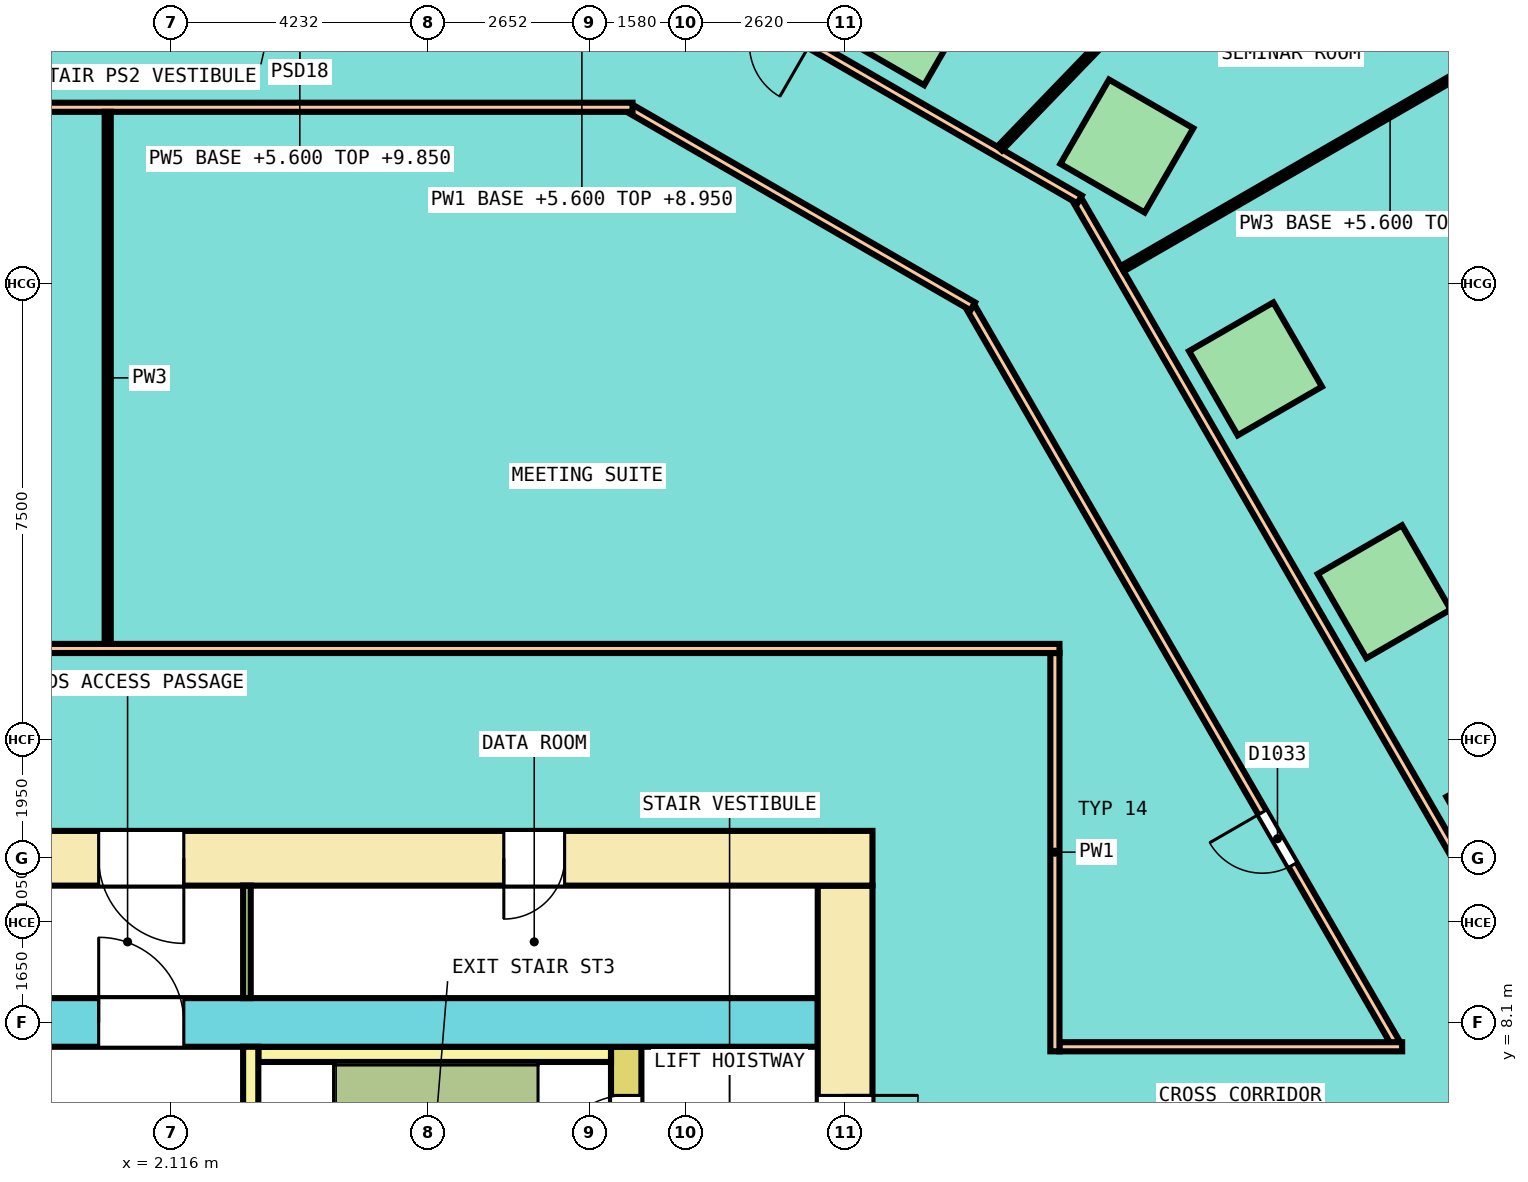
"""IFC4 building model, lengths in metres.
Left out: names, types, materials, properties, quantities, classifications, styles, units other than length and angle.
Written with IfcOpenShell. Run it as: python <this file> out.ifc"""

import sys

from ifc_helpers import new_model, si_unit, direction, frame, frame_2d, origin, origin_2d, place, context, subcontext, project, spatial, rectangle, extrude, element, fill, save


model = new_model("IFC4")
c1 = context("Model", 3, precision=1e-05, world=origin(), true_north=direction((0.0, 1.0)))
c2 = subcontext(c1, "Body", "Model", "MODEL_VIEW")
j1 = project(units=[si_unit("LENGTHUNIT", "METRE"), si_unit("PLANEANGLEUNIT", "RADIAN")], contexts=[c1])
p1 = place(None, origin())
s1 = spatial("IfcSite", under=j1, at=p1, CompositionType="ELEMENT")
p2 = place(p1, origin())
s2 = spatial("IfcBuilding", under=s1, at=p2, CompositionType="ELEMENT")
p3 = place(p2, frame((0.0, 0.0, 5.6)))
s3 = spatial("IfcBuildingStorey", under=s2, at=p3, CompositionType="ELEMENT", Elevation=5.6)
for number, where, z_axis, x_axis in (
    (1, (24.181, 11.518, 0.0), (0.0, 0.0, 1.0), (-0.5, 0.866, 0.0)),
    (2, (22.065, 15.183, 0.0), (0.0, 0.0, 1.0), (-0.5, 0.866, 0.0)),
    (3, (19.949, 18.847, 0.0), (0.0, 0.0, 1.0), (-0.5, 0.866, 0.0)),
    (4, (17.833, 22.512, 0.0), (0.0, 0.0, 1.0), (-0.866, 0.5, 0.0)),
    (5, (14.206, 24.606, 0.0), (0.0, 0.0, 1.0), (-0.866, 0.5, 0.0)),
):
    element("IfcColumn", number, at=place(p3, frame(where, z_axis=z_axis, x_axis=x_axis)), inside=s3, PredefinedType="COLUMN", context=c2, shape_type="SweptSolid", body=[
        extrude(rectangle(XDim=1.6, YDim=1.6, at=origin_2d()), origin(), (0.0, 0.0, 1.0), 4.25),
    ])
p4 = place(p3, frame((-13.65, 10.8, 0.0), z_axis=(0.0, 0.0, 1.0), x_axis=(1.0, 0.0, 0.0)))
e6 = element("IfcWall", 6, at=p4, inside=s3, PredefinedType="SHEAR", context=c2, shape_type="SweptSolid", body=[
    extrude(rectangle(XDim=27.3, YDim=0.9, at=frame_2d((13.65, 0.0))), origin(), (0.0, 0.0, 1.0), 4.3),
])
p5 = place(p4, frame((1.892, 0.0, 0.0)))
e7 = element("IfcOpeningElement", 7, at=p5, cuts=e6, PredefinedType="OPENING", context=c2, shape_type="SweptSolid", body=[
    extrude(rectangle(XDim=1.0, YDim=2.1, at=frame_2d((0.5, 1.05))), frame((0.0, 0.46, 0.0), z_axis=(0.0, -1.0, 0.0), x_axis=(1.0, 0.0, 0.0)), (0.0, 0.0, 1.0), 0.92),
])
p6 = place(p4, frame((4.97, 0.0, 0.0)))
e8 = element("IfcOpeningElement", 8, at=p6, cuts=e6, PredefinedType="OPENING", context=c2, shape_type="SweptSolid", body=[
    extrude(rectangle(XDim=1.0, YDim=2.1, at=frame_2d((0.5, 1.05))), frame((0.0, 0.46, 0.0), z_axis=(0.0, -1.0, 0.0), x_axis=(1.0, 0.0, 0.0)), (0.0, 0.0, 1.0), 0.92),
])
p7 = place(p4, frame((8.017, 0.0, 0.0)))
e9 = element("IfcOpeningElement", 9, at=p7, cuts=e6, PredefinedType="OPENING", context=c2, shape_type="SweptSolid", body=[
    extrude(rectangle(XDim=1.0, YDim=2.1, at=frame_2d((0.5, 1.05))), frame((0.0, 0.46, 0.0), z_axis=(0.0, -1.0, 0.0), x_axis=(1.0, 0.0, 0.0)), (0.0, 0.0, 1.0), 0.92),
])
p8 = place(p4, frame((11.064, 0.0, 0.0)))
e10 = element("IfcOpeningElement", 10, at=p8, cuts=e6, PredefinedType="OPENING", context=c2, shape_type="SweptSolid", body=[
    extrude(rectangle(XDim=1.0, YDim=2.1, at=frame_2d((0.5, 1.05))), frame((0.0, 0.46, 0.0), z_axis=(0.0, -1.0, 0.0), x_axis=(1.0, 0.0, 0.0)), (0.0, 0.0, 1.0), 0.92),
])
p9 = place(p4, frame((21.238, 0.0, 0.0)))
e11 = element("IfcOpeningElement", 11, at=p9, cuts=e6, PredefinedType="OPENING", context=c2, shape_type="SweptSolid", body=[
    extrude(rectangle(XDim=1.0, YDim=2.1, at=frame_2d((0.5, 1.05))), frame((0.0, 0.46, 0.0), z_axis=(0.0, -1.0, 0.0), x_axis=(1.0, 0.0, 0.0)), (0.0, 0.0, 1.0), 0.92),
])
p10 = place(p4, frame((14.575, 0.0, 0.0)))
e12 = element("IfcOpeningElement", 12, at=p10, cuts=e6, PredefinedType="OPENING", context=c2, shape_type="SweptSolid", body=[
    extrude(rectangle(XDim=1.4, YDim=2.1, at=frame_2d((0.7, 1.05))), frame((0.0, 0.46, 0.0), z_axis=(0.0, -1.0, 0.0), x_axis=(1.0, 0.0, 0.0)), (0.0, 0.0, 1.0), 0.92),
])
p11 = place(p3, frame((13.2, -10.35, 0.0), z_axis=(0.0, 0.0, 1.0), x_axis=(0.0, 1.0, 0.0)))
e13 = element("IfcWall", 13, at=p11, inside=s3, PredefinedType="SHEAR", context=c2, shape_type="SweptSolid", body=[
    extrude(rectangle(XDim=20.7, YDim=0.9, at=frame_2d((10.35, 0.0))), origin(), (0.0, 0.0, 1.0), 4.3),
])
p12 = place(p11, frame((9.15, 0.0, 0.0)))
e14 = element("IfcOpeningElement", 14, at=p12, cuts=e13, PredefinedType="OPENING", context=c2, shape_type="SweptSolid", body=[
    extrude(rectangle(XDim=2.4, YDim=2.1, at=frame_2d((1.2, 1.05))), frame((0.0, 0.46, 0.0), z_axis=(0.0, -1.0, 0.0), x_axis=(1.0, 0.0, 0.0)), (0.0, 0.0, 1.0), 0.92),
])
p13 = place(p11, frame((16.05, 0.0, 0.0)))
e15 = element("IfcOpeningElement", 15, at=p13, cuts=e13, PredefinedType="OPENING", context=c2, shape_type="SweptSolid", body=[
    extrude(rectangle(XDim=1.2, YDim=2.1, at=frame_2d((0.6, 1.05))), frame((0.0, 0.46, 0.0), z_axis=(0.0, -1.0, 0.0), x_axis=(1.0, 0.0, 0.0)), (0.0, 0.0, 1.0), 0.92),
])
p14 = place(p11, frame((2.819, 0.0, 0.0)))
e16 = element("IfcOpeningElement", 16, at=p14, cuts=e13, PredefinedType="OPENING", context=c2, shape_type="SweptSolid", body=[
    extrude(rectangle(XDim=1.0, YDim=2.1, at=frame_2d((0.5, 1.05))), frame((0.0, 0.46, 0.0), z_axis=(0.0, -1.0, 0.0), x_axis=(1.0, 0.0, 0.0)), (0.0, 0.0, 1.0), 0.92),
])
p15 = place(p11, frame((4.281, 0.0, 0.0)))
e17 = element("IfcOpeningElement", 17, at=p15, cuts=e13, PredefinedType="OPENING", context=c2, shape_type="SweptSolid", body=[
    extrude(rectangle(XDim=1.0, YDim=2.1, at=frame_2d((0.5, 1.05))), frame((0.0, 0.46, 0.0), z_axis=(0.0, -1.0, 0.0), x_axis=(1.0, 0.0, 0.0)), (0.0, 0.0, 1.0), 0.92),
])
p16 = place(p3, frame((-12.75, 8.1, 0.0), z_axis=(0.0, 0.0, 1.0), x_axis=(1.0, 0.0, 0.0)))
e18 = element("IfcWall", 18, at=p16, inside=s3, PredefinedType="SHEAR", context=c2, shape_type="SweptSolid", body=[
    extrude(rectangle(XDim=25.5, YDim=0.8, at=frame_2d((12.75, 0.0))), origin(), (0.0, 0.0, 1.0), 4.3),
])
p17 = place(p16, frame((13.675, 0.0, 0.0)))
e19 = element("IfcOpeningElement", 19, at=p17, cuts=e18, PredefinedType="OPENING", context=c2, shape_type="SweptSolid", body=[
    extrude(rectangle(XDim=1.4, YDim=2.1, at=frame_2d((0.7, 1.05))), frame((0.0, 0.41, 0.0), z_axis=(0.0, -1.0, 0.0), x_axis=(1.0, 0.0, 0.0)), (0.0, 0.0, 1.0), 0.82),
])
p18 = place(p3, frame((9.6, -7.7, 0.0), z_axis=(0.0, 0.0, 1.0), x_axis=(0.0, 1.0, 0.0)))
e20 = element("IfcWall", 20, at=p18, inside=s3, PredefinedType="SHEAR", context=c2, shape_type="SweptSolid", body=[
    extrude(rectangle(XDim=15.4, YDim=0.5, at=frame_2d((7.7, 0.0))), origin(), (0.0, 0.0, 1.0), 4.3),
])
p19 = place(p18, frame((6.5, 0.0, 0.0)))
e21 = element("IfcOpeningElement", 21, at=p19, cuts=e20, PredefinedType="OPENING", context=c2, shape_type="SweptSolid", body=[
    extrude(rectangle(XDim=2.4, YDim=2.1, at=frame_2d((1.2, 1.05))), frame((0.0, 0.26, 0.0), z_axis=(0.0, -1.0, 0.0), x_axis=(1.0, 0.0, 0.0)), (0.0, 0.0, 1.0), 0.52),
])
p20 = place(p18, frame((13.4, 0.0, 0.0)))
e22 = element("IfcOpeningElement", 22, at=p20, cuts=e20, PredefinedType="OPENING", context=c2, shape_type="SweptSolid", body=[
    extrude(rectangle(XDim=1.2, YDim=2.1, at=frame_2d((0.6, 1.05))), frame((0.0, 0.26, 0.0), z_axis=(0.0, -1.0, 0.0), x_axis=(1.0, 0.0, 0.0)), (0.0, 0.0, 1.0), 0.52),
])
p21 = place(p18, frame((0.9, 0.0, 0.0)))
e23 = element("IfcOpeningElement", 23, at=p21, cuts=e20, PredefinedType="OPENING", context=c2, shape_type="SweptSolid", body=[
    extrude(rectangle(XDim=1.0, YDim=2.1, at=frame_2d((0.5, 1.05))), frame((0.0, 0.26, 0.0), z_axis=(0.0, -1.0, 0.0), x_axis=(1.0, 0.0, 0.0)), (0.0, 0.0, 1.0), 0.52),
])
p22 = place(p3, frame((3.55, 7.575, 0.0), z_axis=(0.0, 0.0, 1.0), x_axis=(1.0, 0.0, 0.0)))
e24 = element("IfcWall", 24, at=p22, inside=s3, PredefinedType="SOLIDWALL", context=c2, shape_type="SweptSolid", body=[
    extrude(rectangle(XDim=5.8, YDim=0.25, at=frame_2d((2.9, 0.0))), origin(), (0.0, 0.0, 1.0), 4.3),
])
p23 = place(p3, frame((3.425, 4.9, 0.0), z_axis=(0.0, 0.0, 1.0), x_axis=(0.0, 1.0, 0.0)))
e25 = element("IfcWall", 25, at=p23, inside=s3, PredefinedType="SOLIDWALL", context=c2, shape_type="SweptSolid", body=[
    extrude(rectangle(XDim=2.8, YDim=0.25, at=frame_2d((1.4, 0.0))), origin(), (0.0, 0.0, 1.0), 4.3),
])
p24 = place(p3, frame((3.363, 8.5, 0.0), z_axis=(0.0, 0.0, 1.0), x_axis=(0.0, 1.0, 0.0)))
e26 = element("IfcWall", 26, at=p24, inside=s3, PredefinedType="PARTITIONING", context=c2, shape_type="SweptSolid", body=[
    extrude(rectangle(XDim=1.85, YDim=0.125, at=frame_2d((0.925, 0.0))), origin(), (0.0, 0.0, 1.0), 4.3),
])
p25 = place(p3, frame((15.272, 19.849, 0.0), z_axis=(0.0, 0.0, 1.0), x_axis=(0.500000635496, -0.86602503688, 0.0)))
e27 = element("IfcWall", 27, at=p25, inside=s3, PredefinedType="PARTITIONING", context=c2, shape_type="SweptSolid", body=[
    extrude(rectangle(XDim=13.953, YDim=0.15, at=frame_2d((6.977, 0.0))), origin(), (0.0, 0.0, 1.0), 3.2),
])
p26 = place(p25, frame((9.577, 0.0, 0.0)))
e28 = element("IfcOpeningElement", 28, at=p26, cuts=e27, PredefinedType="OPENING", context=c2, shape_type="SweptSolid", body=[
    extrude(rectangle(XDim=1.0, YDim=2.1, at=frame_2d((0.5, 1.05))), frame((0.0, 0.085, 0.0), z_axis=(0.0, -1.0, 0.0), x_axis=(1.0, 0.0, 0.0)), (0.0, 0.0, 1.0), 0.17),
])
p27 = place(p3, frame((16.725, 7.7, 0.0), z_axis=(0.0, 0.0, 1.0), x_axis=(1.0, 0.0, 0.0)))
e29 = element("IfcWall", 29, at=p27, inside=s3, PredefinedType="PARTITIONING", context=c2, shape_type="SweptSolid", body=[
    extrude(rectangle(XDim=5.635, YDim=0.15, at=frame_2d((2.818, 0.0))), origin(), (0.0, 0.0, 1.0), 3.2),
])
p28 = place(p3, frame((17.029, 21.606, 0.0), z_axis=(0.0, 0.0, 1.0), x_axis=(0.499999139641, -0.866025900512, 0.0)))
e30 = element("IfcWall", 30, at=p28, inside=s3, PredefinedType="PARTITIONING", context=c2, shape_type="SweptSolid", body=[
    extrude(rectangle(XDim=20.394, YDim=0.15, at=frame_2d((10.197, 0.0))), origin(), (0.0, 0.0, 1.0), 3.2),
])
p29 = place(p28, frame((13.746, 0.0, 0.0)))
e31 = element("IfcOpeningElement", 31, at=p29, cuts=e30, PredefinedType="OPENING", context=c2, shape_type="SweptSolid", body=[
    extrude(rectangle(XDim=1.2, YDim=2.1, at=frame_2d((0.6, 1.05))), frame((0.0, 0.085, 0.0), z_axis=(0.0, -1.0, 0.0), x_axis=(1.0, 0.0, 0.0)), (0.0, 0.0, 1.0), 0.17),
])
p30 = place(p3, frame((10.337, 25.512, 0.0), z_axis=(0.0, 0.0, 1.0), x_axis=(0.866023143435, -0.50000391502, 0.0)))
e32 = element("IfcWall", 32, at=p30, inside=s3, PredefinedType="PARTITIONING", context=c2, shape_type="SweptSolid", body=[
    extrude(rectangle(XDim=7.759, YDim=0.15, at=frame_2d((3.879, 0.0))), origin(), (0.0, 0.0, 1.0), 3.2),
])
p31 = place(p30, frame((1.643, 0.0, 0.0)))
e33 = element("IfcOpeningElement", 33, at=p31, cuts=e32, PredefinedType="OPENING", context=c2, shape_type="SweptSolid", body=[
    extrude(rectangle(XDim=1.0, YDim=2.1, at=frame_2d((0.5, 1.05))), frame((0.0, 0.085, 0.0), z_axis=(0.0, -1.0, 0.0), x_axis=(1.0, 0.0, 0.0)), (0.0, 0.0, 1.0), 0.17),
])
p32 = place(p3, frame((9.694, 23.113, 0.0), z_axis=(0.0, 0.0, 1.0), x_axis=(0.866024786089, -0.500001069878, 0.0)))
e34 = element("IfcWall", 34, at=p32, inside=s3, PredefinedType="PARTITIONING", context=c2, shape_type="SweptSolid", body=[
    extrude(rectangle(XDim=6.473, YDim=0.15, at=frame_2d((3.236, 0.0))), origin(), (0.0, 0.0, 1.0), 3.2),
])
p33 = place(p3, frame((-6.225, 23.15, 0.0), z_axis=(0.0, 0.0, 1.0), x_axis=(1.0, 0.0, 0.0)))
e35 = element("IfcWall", 35, at=p33, inside=s3, PredefinedType="PARTITIONING", context=c2, shape_type="SweptSolid", body=[
    extrude(rectangle(XDim=15.929, YDim=0.15, at=frame_2d((7.964, 0.0))), origin(), (0.0, 0.0, 1.0), 3.2),
])
p34 = place(p3, frame((16.65, 7.625, 0.0), z_axis=(0.0, 0.0, 1.0), x_axis=(0.0, 1.0, 0.0)))
e36 = element("IfcWall", 36, at=p34, inside=s3, PredefinedType="PARTITIONING", context=c2, shape_type="SweptSolid", body=[
    extrude(rectangle(XDim=6.55, YDim=0.15, at=frame_2d((3.275, 0.0))), origin(), (0.0, 0.0, 1.0), 3.2),
])
p35 = place(p3, frame((-6.375, 14.25, 0.0), z_axis=(0.0, 0.0, 1.0), x_axis=(1.0, 0.0, 0.0)))
e37 = element("IfcWall", 37, at=p35, inside=s3, PredefinedType="PARTITIONING", context=c2, shape_type="SweptSolid", body=[
    extrude(rectangle(XDim=23.1, YDim=0.15, at=frame_2d((11.55, 0.0))), origin(), (0.0, 0.0, 1.0), 3.2),
])
p36 = place(p3, frame((17.757, 20.495, 0.0), z_axis=(0.0, 0.0, 1.0), x_axis=(0.866028554658, 0.499994542487, 0.0)))
e38 = element("IfcWall", 38, at=p36, inside=s3, PredefinedType="PARTITIONING", context=c2, shape_type="SweptSolid", body=[
    extrude(rectangle(XDim=10.175, YDim=0.1, at=frame_2d((5.087, 0.0))), origin(), (0.0, 0.0, 1.0), 3.35),
])
p37 = place(p36, frame((6.538, 0.0, 0.0)))
e39 = element("IfcOpeningElement", 39, at=p37, cuts=e38, PredefinedType="OPENING", context=c2, shape_type="SweptSolid", body=[
    extrude(rectangle(XDim=1.2, YDim=2.1, at=frame_2d((0.6, 1.05))), frame((0.0, 0.06, 0.0), z_axis=(0.0, -1.0, 0.0), x_axis=(1.0, 0.0, 0.0)), (0.0, 0.0, 1.0), 0.12),
])
p38 = place(p3, frame((15.744, 22.475, 0.0), z_axis=(0.0, 0.0, 1.0), x_axis=(0.694530893364, 0.719462881713, 0.0)))
e40 = element("IfcWall", 40, at=p38, inside=s3, PredefinedType="PARTITIONING", context=c2, shape_type="SweptSolid", body=[
    extrude(rectangle(XDim=11.369, YDim=0.1, at=frame_2d((5.685, 0.0))), origin(), (0.0, 0.0, 1.0), 3.35),
])
p39 = place(p3, frame((1.073, 14.325, 0.0), z_axis=(0.0, 0.0, 1.0), x_axis=(0.0, 1.0, 0.0)))
e41 = element("IfcWall", 41, at=p39, inside=s3, PredefinedType="PARTITIONING", context=c2, shape_type="SweptSolid", body=[
    extrude(rectangle(XDim=8.75, YDim=0.1, at=frame_2d((4.375, 0.0))), origin(), (0.0, 0.0, 1.0), 3.2),
])
p40 = place(p20, origin())
e42 = element("IfcDoor", 42, at=p40, inside=s3, OperationType="SINGLE_SWING_LEFT", PredefinedType="DOOR", context=c2, shape_type="SweptSolid", body=[
    extrude(rectangle(XDim=1.2, YDim=2.1, at=frame_2d((0.6, 1.05))), frame((0.0, 0.2, 0.0), z_axis=(0.0, -1.0, 0.0), x_axis=(1.0, 0.0, 0.0)), (0.0, 0.0, 1.0), 0.4),
])
fill(e22, e42)
p41 = place(p13, origin())
e43 = element("IfcDoor", 43, at=p41, inside=s3, OperationType="SINGLE_SWING_RIGHT", PredefinedType="DOOR", context=c2, shape_type="SweptSolid", body=[
    extrude(rectangle(XDim=1.2, YDim=2.1, at=frame_2d((0.6, 1.05))), frame((0.0, 0.3, 0.0), z_axis=(0.0, -1.0, 0.0), x_axis=(1.0, 0.0, 0.0)), (0.0, 0.0, 1.0), 0.6),
])
fill(e15, e43)
p42 = place(p17, origin())
e44 = element("IfcDoor", 44, at=p42, inside=s3, OperationType="DOUBLE_DOOR_SINGLE_SWING", PredefinedType="DOOR", context=c2, shape_type="SweptSolid", body=[
    extrude(rectangle(XDim=1.4, YDim=2.1, at=frame_2d((0.7, 1.05))), frame((0.0, 0.3, 0.0), z_axis=(0.0, -1.0, 0.0), x_axis=(1.0, 0.0, 0.0)), (0.0, 0.0, 1.0), 0.6),
])
fill(e19, e44)
p43 = place(p9, origin())
e45 = element("IfcDoor", 45, at=p43, inside=s3, OperationType="SINGLE_SWING_RIGHT", PredefinedType="DOOR", context=c2, shape_type="SweptSolid", body=[
    extrude(rectangle(XDim=1.0, YDim=2.1, at=frame_2d((0.5, 1.05))), frame((0.0, 0.3, 0.0), z_axis=(0.0, -1.0, 0.0), x_axis=(1.0, 0.0, 0.0)), (0.0, 0.0, 1.0), 0.6),
])
fill(e11, e45)
p44 = place(p10, origin())
e46 = element("IfcDoor", 46, at=p44, inside=s3, OperationType="DOUBLE_DOOR_SINGLE_SWING", PredefinedType="DOOR", context=c2, shape_type="SweptSolid", body=[
    extrude(rectangle(XDim=1.4, YDim=2.1, at=frame_2d((0.7, 1.05))), frame((0.0, 0.3, 0.0), z_axis=(0.0, -1.0, 0.0), x_axis=(1.0, 0.0, 0.0)), (0.0, 0.0, 1.0), 0.6),
])
fill(e12, e46)
p45 = place(p26, origin())
e47 = element("IfcDoor", 47, at=p45, inside=s3, OperationType="SINGLE_SWING_LEFT", PredefinedType="DOOR", context=c2, shape_type="SweptSolid", body=[
    extrude(rectangle(XDim=1.0, YDim=2.1, at=frame_2d((0.5, 1.05))), frame((0.0, 0.025, 0.0), z_axis=(0.0, -1.0, 0.0), x_axis=(1.0, 0.0, 0.0)), (0.0, 0.0, 1.0), 0.05),
])
fill(e28, e47)
save(model, sys.argv[1])
